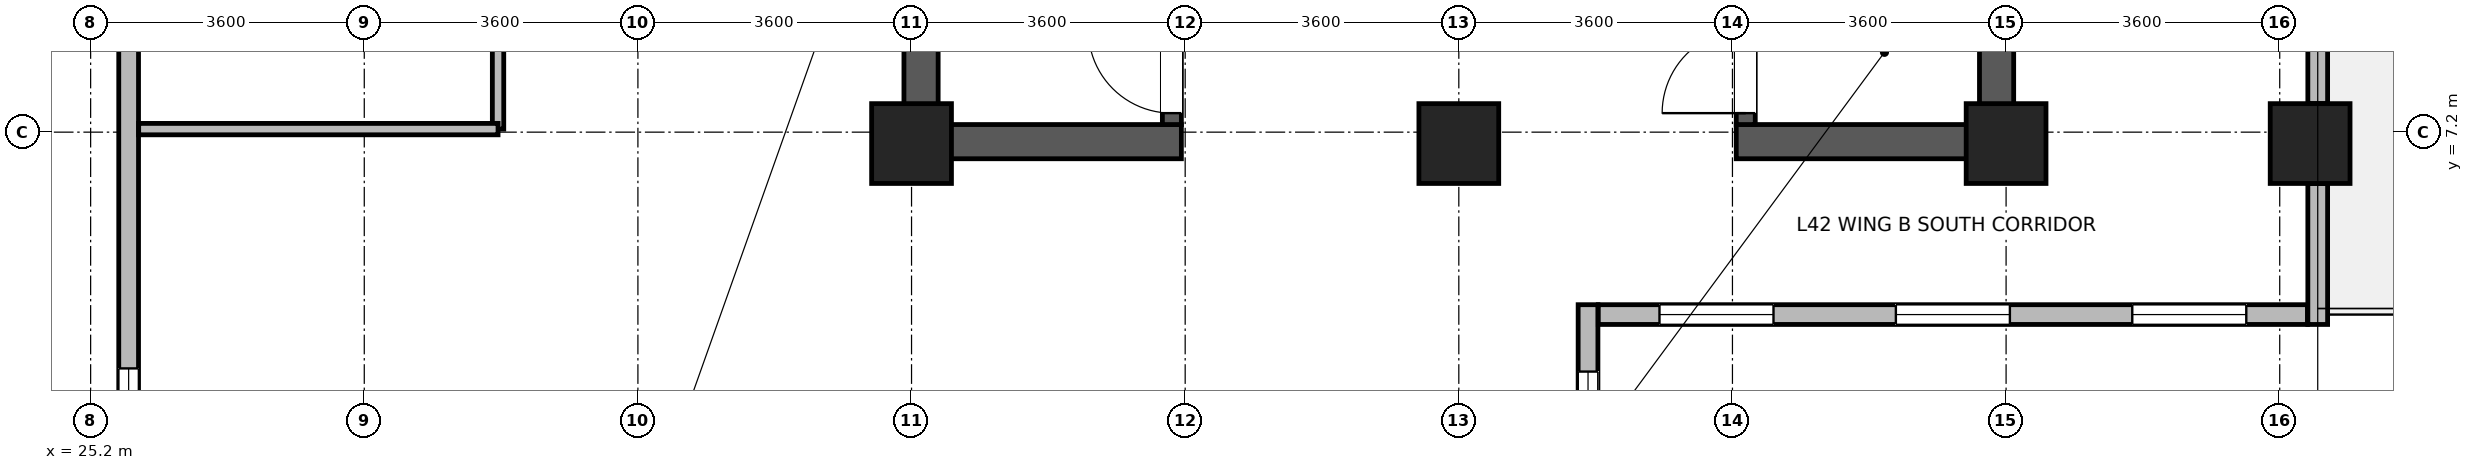
"""IFC4 building model, lengths in metres.
Left out: names, types, materials, properties, quantities, classifications, styles, units other than length and angle.
Written with IfcOpenShell. Run it as: python <this file> out.ifc"""

import sys

from ifc_helpers import new_model, si_unit, direction, frame, frame_2d, origin, origin_2d, place, context, subcontext, project, spatial, rectangle, extrude, source, transform, mapped, element, fill, save


model = new_model("IFC4")
c1 = context("Model", 3, precision=1e-05, world=origin(), true_north=direction((0.0, 1.0)))
c2 = subcontext(c1, "Body", "Model", "MODEL_VIEW")
j1 = project(units=[si_unit("LENGTHUNIT", "METRE"), si_unit("PLANEANGLEUNIT", "RADIAN")], contexts=[c1])
p1 = place(None, origin())
s1 = spatial("IfcSite", under=j1, at=p1, CompositionType="ELEMENT")
p2 = place(p1, origin())
s2 = spatial("IfcBuilding", under=s1, at=p2, CompositionType="ELEMENT")
p3 = place(p2, frame((0.0, 0.0, 166.1)))
s3 = spatial("IfcBuildingStorey", under=s2, at=p3, CompositionType="ELEMENT", Elevation=166.1)
for number, where, z_axis, x_axis in (
    (1, (36.125, 6.85, 0.0), (0.0, 0.0, 1.0), (0.0, 1.0, 0.0)),
    (2, (50.275, 6.85, 0.0), (0.0, 0.0, 1.0), (0.0, 1.0, 0.0)),
):
    element("IfcWall", number, at=place(p3, frame(where, z_axis=z_axis, x_axis=x_axis)), inside=s3, PredefinedType="SHEAR", context=c2, shape_type="SweptSolid", body=[
        extrude(rectangle(XDim=7.9, YDim=0.45, at=frame_2d((3.95, 0.0))), origin(), (0.0, 0.0, 1.0), 3.46),
    ])
for number, where, z_axis, x_axis in (
    (3, (36.35, 7.075, 0.0), (0.0, 0.0, 1.0), (1.0, 0.0, 0.0)),
    (4, (46.85, 7.075, 0.0), (0.0, 0.0, 1.0), (1.0, 0.0, 0.0)),
):
    element("IfcWall", number, at=place(p3, frame(where, z_axis=z_axis, x_axis=x_axis)), inside=s3, PredefinedType="SHEAR", context=c2, shape_type="SweptSolid", body=[
        extrude(rectangle(XDim=3.2, YDim=0.45, at=frame_2d((1.6, 0.0))), origin(), (0.0, 0.0, 1.0), 3.46),
    ])
p4 = place(p3, frame((39.425, 7.3, 0.0), z_axis=(0.0, 0.0, 1.0), x_axis=(0.0, 1.0, 0.0)))
e5 = element("IfcWall", 5, at=p4, inside=s3, PredefinedType="SHEAR", context=c2, shape_type="SweptSolid", body=[
    extrude(rectangle(XDim=7.0, YDim=0.25, at=frame_2d((3.5, 0.0))), origin(), (0.0, 0.0, 1.0), 3.46),
])
p5 = place(p4, frame((0.15, 0.0, 0.0)))
e6 = element("IfcOpeningElement", 6, at=p5, cuts=e5, PredefinedType="OPENING", context=c2, shape_type="SweptSolid", body=[
    extrude(rectangle(XDim=1.1, YDim=2.08, at=frame_2d((0.55, 1.04))), frame((0.0, 0.135, 0.0), z_axis=(0.0, -1.0, 0.0), x_axis=(1.0, 0.0, 0.0)), (0.0, 0.0, 1.0), 0.27),
])
p6 = place(p3, frame((46.975, 7.3, 0.0), z_axis=(0.0, 0.0, 1.0), x_axis=(0.0, 1.0, 0.0)))
e7 = element("IfcWall", 7, at=p6, inside=s3, PredefinedType="SHEAR", context=c2, shape_type="SweptSolid", body=[
    extrude(rectangle(XDim=7.0, YDim=0.25, at=frame_2d((3.5, 0.0))), origin(), (0.0, 0.0, 1.0), 3.46),
])
p7 = place(p6, frame((0.15, 0.0, 0.0)))
e8 = element("IfcOpeningElement", 8, at=p7, cuts=e7, PredefinedType="OPENING", context=c2, shape_type="SweptSolid", body=[
    extrude(rectangle(XDim=1.1, YDim=2.08, at=frame_2d((0.55, 1.04))), frame((0.0, 0.135, 0.0), z_axis=(0.0, -1.0, 0.0), x_axis=(1.0, 0.0, 0.0)), (0.0, 0.0, 1.0), 0.27),
])
m1 = source(origin(), c2, "Body", "SweptSolid", [
    extrude(rectangle(XDim=1.05, YDim=1.05, at=origin_2d()), origin(), (0.0, 0.0, 1.0), 3.7),
])
for number, where, z_axis, x_axis in (
    (9, (36.0, 7.05, 0.0), (0.0, 0.0, 1.0), (1.0, 0.0, 0.0)),
    (10, (43.2, 7.05, 0.0), (0.0, 0.0, 1.0), (1.0, 0.0, 0.0)),
    (11, (50.4, 7.05, 0.0), (0.0, 0.0, 1.0), (1.0, 0.0, 0.0)),
    (12, (54.4, 7.05, 0.0), (0.0, 0.0, 1.0), (1.0, 0.0, 0.0)),
):
    element("IfcColumn", number, at=place(p3, frame(where, z_axis=z_axis, x_axis=x_axis)), inside=s3, PredefinedType="COLUMN", context=c2, shape_type="MappedRepresentation", body=[
        mapped(m1, transform((0.0, 0.0, 0.0), x_axis=(1.0, 0.0, 0.0), y_axis=(0.0, 1.0, 0.0), z_axis=(0.0, 0.0, 1.0), scale=1.0)),
    ])
p8 = place(p3, frame((44.9, 4.93, 0.0), z_axis=(0.0, 0.0, 1.0), x_axis=(0.0, -1.0, 0.0)))
e13 = element("IfcWall", 13, at=p8, inside=s3, PredefinedType="STANDARD", context=c2, shape_type="SweptSolid", body=[
    extrude(rectangle(XDim=3.26, YDim=0.26, at=frame_2d((1.63, 0.0))), origin(), (0.0, 0.0, 1.0), 3.44),
])
p9 = place(p8, frame((0.88, 0.0, 0.85)))
e14 = element("IfcOpeningElement", 14, at=p9, cuts=e13, PredefinedType="OPENING", context=c2, shape_type="SweptSolid", body=[
    extrude(rectangle(XDim=1.5, YDim=1.85, at=frame_2d((0.75, 0.925))), frame((0.0, 0.14, 0.0), z_axis=(0.0, -1.0, 0.0), x_axis=(1.0, 0.0, 0.0)), (0.0, 0.0, 1.0), 0.28),
])
p10 = place(p3, frame((54.365, 4.8, 0.0), z_axis=(0.0, 0.0, 1.0), x_axis=(-1.0, 0.0, 0.0)))
e15 = element("IfcWall", 15, at=p10, inside=s3, PredefinedType="STANDARD", context=c2, shape_type="SweptSolid", body=[
    extrude(rectangle(XDim=9.33, YDim=0.26, at=frame_2d((4.665, 0.0))), origin(), (0.0, 0.0, 1.0), 3.44),
])
p11 = place(p10, frame((0.805, 0.0, 0.85)))
e16 = element("IfcOpeningElement", 16, at=p11, cuts=e15, PredefinedType="OPENING", context=c2, shape_type="SweptSolid", body=[
    extrude(rectangle(XDim=1.5, YDim=1.85, at=frame_2d((0.75, 0.925))), frame((0.0, 0.14, 0.0), z_axis=(0.0, -1.0, 0.0), x_axis=(1.0, 0.0, 0.0)), (0.0, 0.0, 1.0), 0.28),
])
p12 = place(p10, frame((3.915, 0.0, 0.85)))
e17 = element("IfcOpeningElement", 17, at=p12, cuts=e15, PredefinedType="OPENING", context=c2, shape_type="SweptSolid", body=[
    extrude(rectangle(XDim=1.5, YDim=1.85, at=frame_2d((0.75, 0.925))), frame((0.0, 0.14, 0.0), z_axis=(0.0, -1.0, 0.0), x_axis=(1.0, 0.0, 0.0)), (0.0, 0.0, 1.0), 0.28),
])
p13 = place(p10, frame((7.025, 0.0, 0.85)))
e18 = element("IfcOpeningElement", 18, at=p13, cuts=e15, PredefinedType="OPENING", context=c2, shape_type="SweptSolid", body=[
    extrude(rectangle(XDim=1.5, YDim=1.85, at=frame_2d((0.75, 0.925))), frame((0.0, 0.14, 0.0), z_axis=(0.0, -1.0, 0.0), x_axis=(1.0, 0.0, 0.0)), (0.0, 0.0, 1.0), 0.28),
])
p14 = place(p3, frame((54.5, 6.524, 0.0), z_axis=(0.0, 0.0, 1.0), x_axis=(0.0, -1.0, 0.0)))
e19 = element("IfcWall", 19, at=p14, inside=s3, PredefinedType="STANDARD", context=c2, shape_type="SweptSolid", body=[
    extrude(rectangle(XDim=1.854, YDim=0.26, at=frame_2d((0.927, 0.0))), origin(), (0.0, 0.0, 1.0), 3.44),
])
p15 = place(p3, frame((54.5, 14.024, 0.0), z_axis=(0.0, 0.0, 1.0), x_axis=(0.0, -1.0, 0.0)))
e20 = element("IfcWall", 20, at=p15, inside=s3, PredefinedType="STANDARD", context=c2, shape_type="SweptSolid", body=[
    extrude(rectangle(XDim=6.448, YDim=0.26, at=frame_2d((3.224, 0.0))), origin(), (0.0, 0.0, 1.0), 2.99),
])
p16 = place(p15, frame((4.086, 0.0, 0.85)))
e21 = element("IfcOpeningElement", 21, at=p16, cuts=e20, PredefinedType="OPENING", context=c2, shape_type="SweptSolid", body=[
    extrude(rectangle(XDim=1.5, YDim=1.85, at=frame_2d((0.75, 0.925))), frame((0.0, 0.14, 0.0), z_axis=(0.0, -1.0, 0.0), x_axis=(1.0, 0.0, 0.0)), (0.0, 0.0, 1.0), 0.28),
])
p17 = place(p15, frame((2.749, 0.0, 0.85)))
e22 = element("IfcOpeningElement", 22, at=p17, cuts=e20, PredefinedType="OPENING", context=c2, shape_type="SweptSolid", body=[
    extrude(rectangle(XDim=0.95, YDim=1.75, at=frame_2d((0.475, 0.875))), frame((0.0, 0.14, 0.0), z_axis=(0.0, -1.0, 0.0), x_axis=(1.0, 0.0, 0.0)), (0.0, 0.0, 1.0), 0.28),
])
p18 = place(p3, frame((25.7, 1.67, 0.0), z_axis=(0.0, 0.0, 1.0), x_axis=(0.0, 1.0, 0.0)))
e23 = element("IfcWall", 23, at=p18, inside=s3, PredefinedType="STANDARD", context=c2, shape_type="SweptSolid", body=[
    extrude(rectangle(XDim=20.06, YDim=0.26, at=frame_2d((10.03, 0.0))), origin(), (0.0, 0.0, 1.0), 3.44),
])
p19 = place(p18, frame((0.922, 0.0, 0.85)))
e24 = element("IfcOpeningElement", 24, at=p19, cuts=e23, PredefinedType="OPENING", context=c2, shape_type="SweptSolid", body=[
    extrude(rectangle(XDim=1.5, YDim=1.85, at=frame_2d((0.75, 0.925))), frame((0.0, 0.14, 0.0), z_axis=(0.0, -1.0, 0.0), x_axis=(1.0, 0.0, 0.0)), (0.0, 0.0, 1.0), 0.28),
])
p20 = place(p18, frame((7.608, 0.0, 0.85)))
e25 = element("IfcOpeningElement", 25, at=p20, cuts=e23, PredefinedType="OPENING", context=c2, shape_type="SweptSolid", body=[
    extrude(rectangle(XDim=1.5, YDim=1.85, at=frame_2d((0.75, 0.925))), frame((0.0, 0.14, 0.0), z_axis=(0.0, -1.0, 0.0), x_axis=(1.0, 0.0, 0.0)), (0.0, 0.0, 1.0), 0.28),
])
p21 = place(p18, frame((10.952, 0.0, 0.85)))
e26 = element("IfcOpeningElement", 26, at=p21, cuts=e23, PredefinedType="OPENING", context=c2, shape_type="SweptSolid", body=[
    extrude(rectangle(XDim=1.5, YDim=1.85, at=frame_2d((0.75, 0.925))), frame((0.0, 0.14, 0.0), z_axis=(0.0, -1.0, 0.0), x_axis=(1.0, 0.0, 0.0)), (0.0, 0.0, 1.0), 0.28),
])
p22 = place(p18, frame((14.295, 0.0, 0.85)))
e27 = element("IfcOpeningElement", 27, at=p22, cuts=e23, PredefinedType="OPENING", context=c2, shape_type="SweptSolid", body=[
    extrude(rectangle(XDim=1.5, YDim=1.85, at=frame_2d((0.75, 0.925))), frame((0.0, 0.14, 0.0), z_axis=(0.0, -1.0, 0.0), x_axis=(1.0, 0.0, 0.0)), (0.0, 0.0, 1.0), 0.28),
])
p23 = place(p18, frame((17.638, 0.0, 0.85)))
e28 = element("IfcOpeningElement", 28, at=p23, cuts=e23, PredefinedType="OPENING", context=c2, shape_type="SweptSolid", body=[
    extrude(rectangle(XDim=1.5, YDim=1.85, at=frame_2d((0.75, 0.925))), frame((0.0, 0.14, 0.0), z_axis=(0.0, -1.0, 0.0), x_axis=(1.0, 0.0, 0.0)), (0.0, 0.0, 1.0), 0.28),
])
p24 = place(p3, frame((30.56, 7.24, 0.0), z_axis=(0.0, 0.0, 1.0), x_axis=(0.0, 1.0, 0.0)))
e29 = element("IfcWall", 29, at=p24, inside=s3, PredefinedType="PARTITIONING", context=c2, shape_type="SweptSolid", body=[
    extrude(rectangle(XDim=7.26, YDim=0.15, at=frame_2d((3.63, 0.0))), origin(), (0.0, 0.0, 1.0), 3.44),
])
p25 = place(p24, frame((2.98, 0.0, 0.0)))
e30 = element("IfcOpeningElement", 30, at=p25, cuts=e29, PredefinedType="OPENING", context=c2, shape_type="SweptSolid", body=[
    extrude(rectangle(XDim=1.3, YDim=2.12, at=frame_2d((0.65, 1.06))), frame((0.0, 0.085, 0.0), z_axis=(0.0, -1.0, 0.0), x_axis=(1.0, 0.0, 0.0)), (0.0, 0.0, 1.0), 0.17),
])
p26 = place(p3, frame((25.832, 7.24, 0.0), z_axis=(0.0, 0.0, 1.0), x_axis=(1.0, 0.0, 0.0)))
e31 = element("IfcWall", 31, at=p26, inside=s3, PredefinedType="PARTITIONING", context=c2, shape_type="SweptSolid", body=[
    extrude(rectangle(XDim=4.728, YDim=0.15, at=frame_2d((2.364, 0.0))), origin(), (0.0, 0.0, 1.0), 3.44),
])
p27 = place(p9, origin())
e32 = element("IfcWindow", 32, at=p27, inside=s3, PartitioningType="SINGLE_PANEL", PredefinedType="WINDOW", context=c2, shape_type="SweptSolid", body=[
    extrude(rectangle(XDim=1.5, YDim=1.85, at=frame_2d((0.75, 0.925))), frame((0.0, 0.03, 0.0), z_axis=(0.0, -1.0, 0.0), x_axis=(1.0, 0.0, 0.0)), (0.0, 0.0, 1.0), 0.06),
])
fill(e14, e32)
p28 = place(p11, origin())
e33 = element("IfcWindow", 33, at=p28, inside=s3, PartitioningType="SINGLE_PANEL", PredefinedType="WINDOW", context=c2, shape_type="SweptSolid", body=[
    extrude(rectangle(XDim=1.5, YDim=1.85, at=frame_2d((0.75, 0.925))), frame((0.0, 0.03, 0.0), z_axis=(0.0, -1.0, 0.0), x_axis=(1.0, 0.0, 0.0)), (0.0, 0.0, 1.0), 0.06),
])
fill(e16, e33)
p29 = place(p12, origin())
e34 = element("IfcWindow", 34, at=p29, inside=s3, PartitioningType="SINGLE_PANEL", PredefinedType="WINDOW", context=c2, shape_type="SweptSolid", body=[
    extrude(rectangle(XDim=1.5, YDim=1.85, at=frame_2d((0.75, 0.925))), frame((0.0, 0.03, 0.0), z_axis=(0.0, -1.0, 0.0), x_axis=(1.0, 0.0, 0.0)), (0.0, 0.0, 1.0), 0.06),
])
fill(e17, e34)
p30 = place(p13, origin())
e35 = element("IfcWindow", 35, at=p30, inside=s3, PartitioningType="SINGLE_PANEL", PredefinedType="WINDOW", context=c2, shape_type="SweptSolid", body=[
    extrude(rectangle(XDim=1.5, YDim=1.85, at=frame_2d((0.75, 0.925))), frame((0.0, 0.03, 0.0), z_axis=(0.0, -1.0, 0.0), x_axis=(1.0, 0.0, 0.0)), (0.0, 0.0, 1.0), 0.06),
])
fill(e18, e35)
p31 = place(p19, origin())
e36 = element("IfcWindow", 36, at=p31, inside=s3, PartitioningType="SINGLE_PANEL", PredefinedType="WINDOW", context=c2, shape_type="SweptSolid", body=[
    extrude(rectangle(XDim=1.5, YDim=1.85, at=frame_2d((0.75, 0.925))), frame((0.0, 0.03, 0.0), z_axis=(0.0, -1.0, 0.0), x_axis=(1.0, 0.0, 0.0)), (0.0, 0.0, 1.0), 0.06),
])
fill(e24, e36)
p32 = place(p5, origin())
e37 = element("IfcDoor", 37, at=p32, inside=s3, OperationType="SINGLE_SWING_RIGHT", PredefinedType="DOOR", context=c2, shape_type="SweptSolid", body=[
    extrude(rectangle(XDim=1.1, YDim=2.08, at=frame_2d((0.55, 1.04))), frame((0.0, 0.025, 0.0), z_axis=(0.0, -1.0, 0.0), x_axis=(1.0, 0.0, 0.0)), (0.0, 0.0, 1.0), 0.05),
])
fill(e6, e37)
p33 = place(p7, origin())
e38 = element("IfcDoor", 38, at=p33, inside=s3, OperationType="SINGLE_SWING_LEFT", PredefinedType="DOOR", context=c2, shape_type="SweptSolid", body=[
    extrude(rectangle(XDim=1.1, YDim=2.08, at=frame_2d((0.55, 1.04))), frame((0.0, 0.025, 0.0), z_axis=(0.0, -1.0, 0.0), x_axis=(1.0, 0.0, 0.0)), (0.0, 0.0, 1.0), 0.05),
])
fill(e8, e38)
save(model, sys.argv[1])
